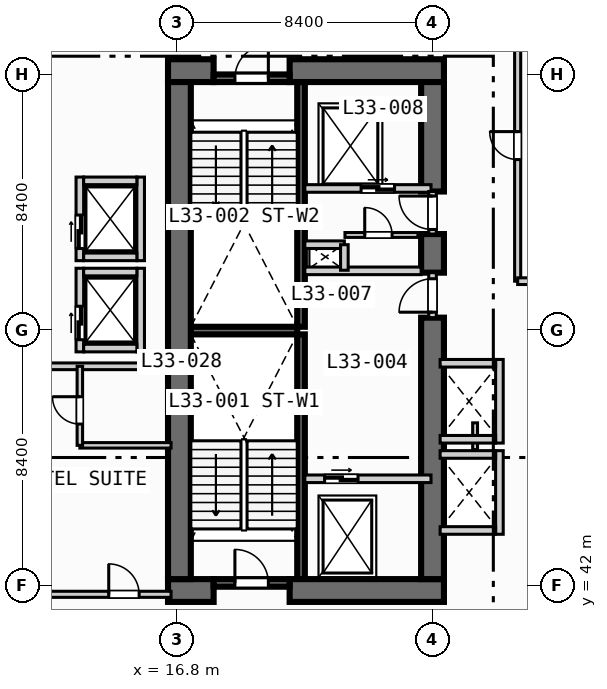
"""IFC4 building model, lengths in metres.
Left out: names, types, materials, properties, quantities, classifications, styles, units other than length and angle.
Written with IfcOpenShell. Run it as: python <this file> out.ifc"""

import sys

from ifc_helpers import new_model, si_unit, direction, frame, frame_2d, origin, place, context, subcontext, project, spatial, rectangle, extrude, element, fill, save


model = new_model("IFC4")
c1 = context("Model", 3, precision=1e-05, world=origin(), true_north=direction((0.0, 1.0)))
c2 = subcontext(c1, "Body", "Model", "MODEL_VIEW")
j1 = project(units=[si_unit("LENGTHUNIT", "METRE"), si_unit("PLANEANGLEUNIT", "RADIAN")], contexts=[c1])
p1 = place(None, origin())
s1 = spatial("IfcSite", under=j1, at=p1, CompositionType="ELEMENT")
p2 = place(p1, origin())
s2 = spatial("IfcBuilding", under=s1, at=p2, CompositionType="ELEMENT")
p3 = place(p2, frame((0.0, 0.0, 138.0)))
s3 = spatial("IfcBuildingStorey", under=s2, at=p3, CompositionType="ELEMENT", Elevation=138.0)
for number, where, z_axis, x_axis in (
    (1, (20.875, 42.2, 0.0), (0.0, 0.0, 1.0), (0.0, 1.0, 0.0)),
    (2, (20.875, 50.5, 0.0), (0.0, 0.0, 1.0), (0.0, 1.0, 0.0)),
):
    element("IfcWall", number, at=place(p3, frame(where, z_axis=z_axis, x_axis=x_axis)), inside=s3, PredefinedType="SOLIDWALL", context=c2, shape_type="SweptSolid", body=[
        extrude(rectangle(XDim=8.05, YDim=0.25, at=frame_2d((4.025, 0.0))), origin(), (0.0, 0.0, 1.0), 3.55),
    ])
p4 = place(p3, frame((17.25, 50.375, 0.0), z_axis=(0.0, 0.0, 1.0), x_axis=(1.0, 0.0, 0.0)))
e3 = element("IfcWall", 3, at=p4, inside=s3, PredefinedType="SOLIDWALL", context=c2, shape_type="SweptSolid", body=[
    extrude(rectangle(XDim=3.5, YDim=0.25, at=frame_2d((1.75, 0.0))), origin(), (0.0, 0.0, 1.0), 3.55),
])
p5 = place(p3, frame((16.5, 41.825, 0.0), z_axis=(0.0, 0.0, 1.0), x_axis=(1.0, 0.0, 0.0)))
e4 = element("IfcWall", 4, at=p5, inside=s3, PredefinedType="SHEAR", context=c2, shape_type="SweptSolid", body=[
    extrude(rectangle(XDim=1.5, YDim=0.75, at=frame_2d((0.75, 0.0))), origin(), (0.0, 0.0, 1.0), 3.55),
])
p6 = place(p3, frame((20.5, 41.825, 0.0), z_axis=(0.0, 0.0, 1.0), x_axis=(1.0, 0.0, 0.0)))
e5 = element("IfcWall", 5, at=p6, inside=s3, PredefinedType="SHEAR", context=c2, shape_type="SweptSolid", body=[
    extrude(rectangle(XDim=5.075, YDim=0.75, at=frame_2d((2.538, 0.0))), origin(), (0.0, 0.0, 1.0), 3.55),
])
p7 = place(p3, frame((16.5, 58.925, 0.0), z_axis=(0.0, 0.0, 1.0), x_axis=(1.0, 0.0, 0.0)))
e6 = element("IfcWall", 6, at=p7, inside=s3, PredefinedType="SHEAR", context=c2, shape_type="SweptSolid", body=[
    extrude(rectangle(XDim=1.5, YDim=0.75, at=frame_2d((0.75, 0.0))), origin(), (0.0, 0.0, 1.0), 3.55),
])
p8 = place(p3, frame((20.5, 58.925, 0.0), z_axis=(0.0, 0.0, 1.0), x_axis=(1.0, 0.0, 0.0)))
e7 = element("IfcWall", 7, at=p8, inside=s3, PredefinedType="SHEAR", context=c2, shape_type="SweptSolid", body=[
    extrude(rectangle(XDim=5.075, YDim=0.75, at=frame_2d((2.538, 0.0))), origin(), (0.0, 0.0, 1.0), 3.55),
])
p9 = place(p3, frame((16.875, 42.2, 0.0), z_axis=(0.0, 0.0, 1.0), x_axis=(0.0, 1.0, 0.0)))
e8 = element("IfcWall", 8, at=p9, inside=s3, PredefinedType="SHEAR", context=c2, shape_type="SweptSolid", body=[
    extrude(rectangle(XDim=16.35, YDim=0.75, at=frame_2d((8.175, 0.0))), origin(), (0.0, 0.0, 1.0), 3.55),
])
p10 = place(p3, frame((25.2, 42.2, 0.0), z_axis=(0.0, 0.0, 1.0), x_axis=(0.0, 1.0, 0.0)))
e9 = element("IfcWall", 9, at=p10, inside=s3, PredefinedType="SHEAR", context=c2, shape_type="SweptSolid", body=[
    extrude(rectangle(XDim=8.6, YDim=0.75, at=frame_2d((4.3, 0.0))), origin(), (0.0, 0.0, 1.0), 3.55),
])
p11 = place(p3, frame((25.2, 52.28, 0.0), z_axis=(0.0, 0.0, 1.0), x_axis=(0.0, 1.0, 0.0)))
e10 = element("IfcWall", 10, at=p11, inside=s3, PredefinedType="SHEAR", context=c2, shape_type="SweptSolid", body=[
    extrude(rectangle(XDim=1.27, YDim=0.75, at=frame_2d((0.635, 0.0))), origin(), (0.0, 0.0, 1.0), 3.55),
])
p12 = place(p3, frame((25.2, 54.95, 0.0), z_axis=(0.0, 0.0, 1.0), x_axis=(0.0, 1.0, 0.0)))
e11 = element("IfcWall", 11, at=p12, inside=s3, PredefinedType="SHEAR", context=c2, shape_type="SweptSolid", body=[
    extrude(rectangle(XDim=3.6, YDim=0.75, at=frame_2d((1.8, 0.0))), origin(), (0.0, 0.0, 1.0), 3.55),
])
p13 = place(p3, frame((18.0, 42.075, 0.0), z_axis=(0.0, 0.0, 1.0), x_axis=(1.0, 0.0, 0.0)))
e12 = element("IfcWall", 12, at=p13, inside=s3, PredefinedType="SOLIDWALL", context=c2, shape_type="SweptSolid", body=[
    extrude(rectangle(XDim=2.5, YDim=0.25, at=frame_2d((1.25, 0.0))), origin(), (0.0, 0.0, 1.0), 3.55),
])
p14 = place(p13, frame((0.7, 0.0, 0.0)))
e13 = element("IfcOpeningElement", 13, at=p14, cuts=e12, PredefinedType="OPENING", context=c2, shape_type="SweptSolid", body=[
    extrude(rectangle(XDim=1.1, YDim=2.15, at=frame_2d((0.55, 1.075))), frame((0.0, 0.135, 0.0), z_axis=(0.0, -1.0, 0.0), x_axis=(1.0, 0.0, 0.0)), (0.0, 0.0, 1.0), 0.27),
])
p15 = place(p3, frame((18.0, 58.675, 0.0), z_axis=(0.0, 0.0, 1.0), x_axis=(1.0, 0.0, 0.0)))
e14 = element("IfcWall", 14, at=p15, inside=s3, PredefinedType="SOLIDWALL", context=c2, shape_type="SweptSolid", body=[
    extrude(rectangle(XDim=2.5, YDim=0.25, at=frame_2d((1.25, 0.0))), origin(), (0.0, 0.0, 1.0), 3.55),
])
p16 = place(p15, frame((0.7, 0.0, 0.0)))
e15 = element("IfcOpeningElement", 15, at=p16, cuts=e14, PredefinedType="OPENING", context=c2, shape_type="SweptSolid", body=[
    extrude(rectangle(XDim=1.1, YDim=2.15, at=frame_2d((0.55, 1.075))), frame((0.0, 0.135, 0.0), z_axis=(0.0, -1.0, 0.0), x_axis=(1.0, 0.0, 0.0)), (0.0, 0.0, 1.0), 0.27),
])
p17 = place(p3, frame((21.0, 45.5, 0.0), z_axis=(0.0, 0.0, 1.0), x_axis=(1.0, 0.0, 0.0)))
e16 = element("IfcWall", 16, at=p17, inside=s3, PredefinedType="SOLIDWALL", context=c2, shape_type="SweptSolid", body=[
    extrude(rectangle(XDim=4.15, YDim=0.25, at=frame_2d((2.075, 0.0))), origin(), (0.0, 0.0, 1.0), 3.55),
])
p18 = place(p17, frame((0.65, 0.0, 0.0)))
e17 = element("IfcOpeningElement", 17, at=p18, cuts=e16, PredefinedType="OPENING", context=c2, shape_type="SweptSolid", body=[
    extrude(rectangle(XDim=1.1, YDim=2.15, at=frame_2d((0.55, 1.075))), frame((0.0, 0.135, 0.0), z_axis=(0.0, -1.0, 0.0), x_axis=(1.0, 0.0, 0.0)), (0.0, 0.0, 1.0), 0.27),
])
p19 = place(p3, frame((25.2, 50.8, 0.0), z_axis=(0.0, 0.0, 1.0), x_axis=(0.0, 1.0, 0.0)))
e18 = element("IfcWall", 18, at=p19, inside=s3, PredefinedType="SOLIDWALL", context=c2, shape_type="SweptSolid", body=[
    extrude(rectangle(XDim=1.48, YDim=0.25, at=frame_2d((0.74, 0.0))), origin(), (0.0, 0.0, 1.0), 3.55),
])
p20 = place(p19, frame((0.18, 0.0, 0.0)))
e19 = element("IfcOpeningElement", 19, at=p20, cuts=e18, PredefinedType="OPENING", context=c2, shape_type="SweptSolid", body=[
    extrude(rectangle(XDim=1.1, YDim=2.15, at=frame_2d((0.55, 1.075))), frame((0.0, 0.135, 0.0), z_axis=(0.0, -1.0, 0.0), x_axis=(1.0, 0.0, 0.0)), (0.0, 0.0, 1.0), 0.27),
])
p21 = place(p3, frame((21.0, 52.34, 0.0), z_axis=(0.0, 0.0, 1.0), x_axis=(1.0, 0.0, 0.0)))
e20 = element("IfcWall", 20, at=p21, inside=s3, PredefinedType="SOLIDWALL", context=c2, shape_type="SweptSolid", body=[
    extrude(rectangle(XDim=3.825, YDim=0.25, at=frame_2d((1.913, 0.0))), origin(), (0.0, 0.0, 1.0), 3.55),
])
p22 = place(p3, frame((21.0, 55.05, 0.0), z_axis=(0.0, 0.0, 1.0), x_axis=(1.0, 0.0, 0.0)))
e21 = element("IfcWall", 21, at=p22, inside=s3, PredefinedType="SOLIDWALL", context=c2, shape_type="SweptSolid", body=[
    extrude(rectangle(XDim=4.15, YDim=0.25, at=frame_2d((2.075, 0.0))), origin(), (0.0, 0.0, 1.0), 3.55),
])
p23 = place(p22, frame((1.85, 0.0, 0.0)))
e22 = element("IfcOpeningElement", 22, at=p23, cuts=e21, PredefinedType="OPENING", context=c2, shape_type="SweptSolid", body=[
    extrude(rectangle(XDim=1.1, YDim=2.15, at=frame_2d((0.55, 1.075))), frame((0.0, 0.135, 0.0), z_axis=(0.0, -1.0, 0.0), x_axis=(1.0, 0.0, 0.0)), (0.0, 0.0, 1.0), 0.27),
])
p24 = place(p3, frame((25.2, 53.55, 0.0), z_axis=(0.0, 0.0, 1.0), x_axis=(0.0, 1.0, 0.0)))
e23 = element("IfcWall", 23, at=p24, inside=s3, PredefinedType="SOLIDWALL", context=c2, shape_type="SweptSolid", body=[
    extrude(rectangle(XDim=1.4, YDim=0.25, at=frame_2d((0.7, 0.0))), origin(), (0.0, 0.0, 1.0), 3.55),
])
p25 = place(p24, frame((0.15, 0.0, 0.0)))
e24 = element("IfcOpeningElement", 24, at=p25, cuts=e23, PredefinedType="OPENING", context=c2, shape_type="SweptSolid", body=[
    extrude(rectangle(XDim=1.1, YDim=2.15, at=frame_2d((0.55, 1.075))), frame((0.0, 0.135, 0.0), z_axis=(0.0, -1.0, 0.0), x_axis=(1.0, 0.0, 0.0)), (0.0, 0.0, 1.0), 0.27),
])
p26 = place(p3, frame((21.0, 53.2, 0.0), z_axis=(0.0, 0.0, 1.0), x_axis=(1.0, 0.0, 0.0)))
e25 = element("IfcWall", 25, at=p26, inside=s3, PredefinedType="SOLIDWALL", context=c2, shape_type="SweptSolid", body=[
    extrude(rectangle(XDim=1.3, YDim=0.25, at=frame_2d((0.65, 0.0))), origin(), (0.0, 0.0, 1.0), 3.55),
])
p27 = place(p3, frame((22.3, 52.36, 0.0), z_axis=(0.0, 0.0, 1.0), x_axis=(0.0, 1.0, 0.0)))
e26 = element("IfcWall", 26, at=p27, inside=s3, PredefinedType="SOLIDWALL", context=c2, shape_type="SweptSolid", body=[
    extrude(rectangle(XDim=0.84, YDim=0.25, at=frame_2d((0.42, 0.0))), origin(), (0.0, 0.0, 1.0), 3.55),
])
p28 = place(p3, frame((22.32, 53.52, 0.0), z_axis=(0.0, 0.0, 1.0), x_axis=(1.0, 0.0, 0.0)))
e27 = element("IfcWall", 27, at=p28, inside=s3, PredefinedType="PARTITIONING", context=c2, shape_type="SweptSolid", body=[
    extrude(rectangle(XDim=2.4, YDim=0.16, at=frame_2d((1.2, 0.0))), origin(), (0.0, 0.0, 1.0), 3.55),
])
p29 = place(p28, frame((0.65, 0.0, 0.0)))
e28 = element("IfcOpeningElement", 28, at=p29, cuts=e27, PredefinedType="OPENING", context=c2, shape_type="SweptSolid", body=[
    extrude(rectangle(XDim=0.9, YDim=2.1, at=frame_2d((0.45, 1.05))), frame((0.0, 0.09, 0.0), z_axis=(0.0, -1.0, 0.0), x_axis=(1.0, 0.0, 0.0)), (0.0, 0.0, 1.0), 0.18),
])
p30 = place(p3, frame((13.6, 49.675, 0.0), z_axis=(0.0, 0.0, 1.0), x_axis=(0.0, 1.0, 0.0)))
e29 = element("IfcWall", 29, at=p30, inside=s3, PredefinedType="SOLIDWALL", context=c2, shape_type="SweptSolid", body=[
    extrude(rectangle(XDim=2.75, YDim=0.25, at=frame_2d((1.375, 0.0))), origin(), (0.0, 0.0, 1.0), 3.55),
])
p31 = place(p30, frame((0.4, 0.0, 0.0)))
e30 = element("IfcOpeningElement", 30, at=p31, cuts=e29, PredefinedType="OPENING", context=c2, shape_type="SweptSolid", body=[
    extrude(rectangle(XDim=1.1, YDim=2.15, at=frame_2d((0.55, 1.075))), frame((0.0, 0.135, 0.0), z_axis=(0.0, -1.0, 0.0), x_axis=(1.0, 0.0, 0.0)), (0.0, 0.0, 1.0), 0.27),
])
p32 = place(p3, frame((15.6, 49.675, 0.0), z_axis=(0.0, 0.0, 1.0), x_axis=(0.0, 1.0, 0.0)))
e31 = element("IfcWall", 31, at=p32, inside=s3, PredefinedType="SOLIDWALL", context=c2, shape_type="SweptSolid", body=[
    extrude(rectangle(XDim=2.75, YDim=0.25, at=frame_2d((1.375, 0.0))), origin(), (0.0, 0.0, 1.0), 3.55),
])
for number, where, z_axis, x_axis in (
    (32, (13.725, 49.8, 0.0), (0.0, 0.0, 1.0), (1.0, 0.0, 0.0)),
    (33, (13.725, 52.3, 0.0), (0.0, 0.0, 1.0), (1.0, 0.0, 0.0)),
):
    element("IfcWall", number, at=place(p3, frame(where, z_axis=z_axis, x_axis=x_axis)), inside=s3, PredefinedType="SOLIDWALL", context=c2, shape_type="SweptSolid", body=[
        extrude(rectangle(XDim=1.75, YDim=0.25, at=frame_2d((0.875, 0.0))), origin(), (0.0, 0.0, 1.0), 3.55),
    ])
p33 = place(p3, frame((13.6, 52.675, 0.0), z_axis=(0.0, 0.0, 1.0), x_axis=(0.0, 1.0, 0.0)))
e34 = element("IfcWall", 34, at=p33, inside=s3, PredefinedType="SOLIDWALL", context=c2, shape_type="SweptSolid", body=[
    extrude(rectangle(XDim=2.75, YDim=0.25, at=frame_2d((1.375, 0.0))), origin(), (0.0, 0.0, 1.0), 3.55),
])
p34 = place(p33, frame((0.4, 0.0, 0.0)))
e35 = element("IfcOpeningElement", 35, at=p34, cuts=e34, PredefinedType="OPENING", context=c2, shape_type="SweptSolid", body=[
    extrude(rectangle(XDim=1.1, YDim=2.15, at=frame_2d((0.55, 1.075))), frame((0.0, 0.135, 0.0), z_axis=(0.0, -1.0, 0.0), x_axis=(1.0, 0.0, 0.0)), (0.0, 0.0, 1.0), 0.27),
])
p35 = place(p3, frame((15.6, 52.675, 0.0), z_axis=(0.0, 0.0, 1.0), x_axis=(0.0, 1.0, 0.0)))
e36 = element("IfcWall", 36, at=p35, inside=s3, PredefinedType="SOLIDWALL", context=c2, shape_type="SweptSolid", body=[
    extrude(rectangle(XDim=2.75, YDim=0.25, at=frame_2d((1.375, 0.0))), origin(), (0.0, 0.0, 1.0), 3.55),
])
for number, where, z_axis, x_axis in (
    (37, (13.725, 52.8, 0.0), (0.0, 0.0, 1.0), (1.0, 0.0, 0.0)),
    (38, (13.725, 55.3, 0.0), (0.0, 0.0, 1.0), (1.0, 0.0, 0.0)),
):
    element("IfcWall", number, at=place(p3, frame(where, z_axis=z_axis, x_axis=x_axis)), inside=s3, PredefinedType="SOLIDWALL", context=c2, shape_type="SweptSolid", body=[
        extrude(rectangle(XDim=1.75, YDim=0.25, at=frame_2d((0.875, 0.0))), origin(), (0.0, 0.0, 1.0), 3.55),
    ])
p36 = place(p3, frame((27.4, 43.675, 0.0), z_axis=(0.0, 0.0, 1.0), x_axis=(0.0, 1.0, 0.0)))
e39 = element("IfcWall", 39, at=p36, inside=s3, PredefinedType="SOLIDWALL", context=c2, shape_type="SweptSolid", body=[
    extrude(rectangle(XDim=2.75, YDim=0.25, at=frame_2d((1.375, 0.0))), origin(), (0.0, 0.0, 1.0), 3.55),
])
for number, where, z_axis, x_axis in (
    (40, (25.45, 43.8, 0.0), (0.0, 0.0, 1.0), (1.0, 0.0, 0.0)),
    (41, (25.45, 46.3, 0.0), (0.0, 0.0, 1.0), (1.0, 0.0, 0.0)),
):
    element("IfcWall", number, at=place(p3, frame(where, z_axis=z_axis, x_axis=x_axis)), inside=s3, PredefinedType="SOLIDWALL", context=c2, shape_type="SweptSolid", body=[
        extrude(rectangle(XDim=1.825, YDim=0.25, at=frame_2d((0.913, 0.0))), origin(), (0.0, 0.0, 1.0), 3.55),
    ])
p37 = place(p3, frame((26.6, 46.46, 0.0), z_axis=(0.0, 0.0, 1.0), x_axis=(0.0, 1.0, 0.0)))
e42 = element("IfcWall", 42, at=p37, inside=s3, PredefinedType="PARTITIONING", context=c2, shape_type="SweptSolid", body=[
    extrude(rectangle(XDim=0.88, YDim=0.16, at=frame_2d((0.44, 0.0))), origin(), (0.0, 0.0, 1.0), 3.55),
])
p38 = place(p3, frame((27.4, 46.675, 0.0), z_axis=(0.0, 0.0, 1.0), x_axis=(0.0, 1.0, 0.0)))
e43 = element("IfcWall", 43, at=p38, inside=s3, PredefinedType="SOLIDWALL", context=c2, shape_type="SweptSolid", body=[
    extrude(rectangle(XDim=2.75, YDim=0.25, at=frame_2d((1.375, 0.0))), origin(), (0.0, 0.0, 1.0), 3.55),
])
for number, where, z_axis, x_axis in (
    (44, (25.45, 46.8, 0.0), (0.0, 0.0, 1.0), (1.0, 0.0, 0.0)),
    (45, (25.45, 49.3, 0.0), (0.0, 0.0, 1.0), (1.0, 0.0, 0.0)),
):
    element("IfcWall", number, at=place(p3, frame(where, z_axis=z_axis, x_axis=x_axis)), inside=s3, PredefinedType="SOLIDWALL", context=c2, shape_type="SweptSolid", body=[
        extrude(rectangle(XDim=1.825, YDim=0.25, at=frame_2d((0.913, 0.0))), origin(), (0.0, 0.0, 1.0), 3.55),
    ])
p39 = place(p3, frame((0.35, 41.7, 0.0), z_axis=(0.0, 0.0, 1.0), x_axis=(1.0, 0.0, 0.0)))
e46 = element("IfcWall", 46, at=p39, inside=s3, PredefinedType="PARTITIONING", context=c2, shape_type="SweptSolid", body=[
    extrude(rectangle(XDim=16.25, YDim=0.2, at=frame_2d((8.125, 0.0))), origin(), (0.0, 0.0, 1.0), 2.8),
])
p40 = place(p39, frame((14.2, 0.0, 0.0)))
e47 = element("IfcOpeningElement", 47, at=p40, cuts=e46, PredefinedType="OPENING", context=c2, shape_type="SweptSolid", body=[
    extrude(rectangle(XDim=1.0, YDim=2.15, at=frame_2d((0.5, 1.075))), frame((0.0, 0.11, 0.0), z_axis=(0.0, -1.0, 0.0), x_axis=(1.0, 0.0, 0.0)), (0.0, 0.0, 1.0), 0.22),
])
p41 = place(p3, frame((0.35, 49.2, 0.0), z_axis=(0.0, 0.0, 1.0), x_axis=(1.0, 0.0, 0.0)))
e48 = element("IfcWall", 48, at=p41, inside=s3, PredefinedType="PARTITIONING", context=c2, shape_type="SweptSolid", body=[
    extrude(rectangle(XDim=16.25, YDim=0.22, at=frame_2d((8.125, 0.0))), origin(), (0.0, 0.0, 1.0), 3.55),
])
p42 = place(p3, frame((13.6, 46.6, 0.0), z_axis=(0.0, 0.0, 1.0), x_axis=(1.0, 0.0, 0.0)))
e49 = element("IfcWall", 49, at=p42, inside=s3, PredefinedType="PLUMBINGWALL", context=c2, shape_type="SweptSolid", body=[
    extrude(rectangle(XDim=3.0, YDim=0.18, at=frame_2d((1.5, 0.0))), origin(), (0.0, 0.0, 1.0), 3.55),
])
p43 = place(p3, frame((13.6, 46.6, 0.0), z_axis=(0.0, 0.0, 1.0), x_axis=(0.0, 1.0, 0.0)))
e50 = element("IfcWall", 50, at=p43, inside=s3, PredefinedType="PLUMBINGWALL", context=c2, shape_type="SweptSolid", body=[
    extrude(rectangle(XDim=2.6, YDim=0.18, at=frame_2d((1.3, 0.0))), origin(), (0.0, 0.0, 1.0), 3.55),
])
p44 = place(p43, frame((0.7, 0.0, 0.0)))
e51 = element("IfcOpeningElement", 51, at=p44, cuts=e50, PredefinedType="OPENING", context=c2, shape_type="SweptSolid", body=[
    extrude(rectangle(XDim=0.9, YDim=2.1, at=frame_2d((0.45, 1.05))), frame((0.0, 0.1, 0.0), z_axis=(0.0, -1.0, 0.0), x_axis=(1.0, 0.0, 0.0)), (0.0, 0.0, 1.0), 0.2),
])
p45 = place(p3, frame((28.0, 52.0, 0.0), z_axis=(0.0, 0.0, 1.0), x_axis=(0.0, 1.0, 0.0)))
e52 = element("IfcWall", 52, at=p45, inside=s3, PredefinedType="PARTITIONING", context=c2, shape_type="SweptSolid", body=[
    extrude(rectangle(XDim=37.0, YDim=0.2, at=frame_2d((18.5, 0.0))), origin(), (0.0, 0.0, 1.0), 3.55),
])
p46 = place(p45, frame((4.0, 0.0, 0.0)))
e53 = element("IfcOpeningElement", 53, at=p46, cuts=e52, PredefinedType="OPENING", context=c2, shape_type="SweptSolid", body=[
    extrude(rectangle(XDim=0.92, YDim=2.1, at=frame_2d((0.46, 1.05))), frame((0.0, 0.11, 0.0), z_axis=(0.0, -1.0, 0.0), x_axis=(1.0, 0.0, 0.0)), (0.0, 0.0, 1.0), 0.22),
])
p47 = place(p3, frame((28.0, 52.0, 0.0), z_axis=(0.0, 0.0, 1.0), x_axis=(1.0, 0.0, 0.0)))
e54 = element("IfcWall", 54, at=p47, inside=s3, PredefinedType="PARTITIONING", context=c2, shape_type="SweptSolid", body=[
    extrude(rectangle(XDim=5.3, YDim=0.22, at=frame_2d((2.65, 0.0))), origin(), (0.0, 0.0, 1.0), 3.55),
])
p48 = place(p14, origin())
e55 = element("IfcDoor", 55, at=p48, inside=s3, OperationType="SINGLE_SWING_LEFT", PredefinedType="DOOR", context=c2, shape_type="SweptSolid", body=[
    extrude(rectangle(XDim=1.1, YDim=2.15, at=frame_2d((0.55, 1.075))), frame((0.0, 0.025, 0.0), z_axis=(0.0, -1.0, 0.0), x_axis=(1.0, 0.0, 0.0)), (0.0, 0.0, 1.0), 0.05),
])
fill(e13, e55)
p49 = place(p16, origin())
e56 = element("IfcDoor", 56, at=p49, inside=s3, OperationType="SINGLE_SWING_RIGHT", PredefinedType="DOOR", context=c2, shape_type="SweptSolid", body=[
    extrude(rectangle(XDim=1.1, YDim=2.15, at=frame_2d((0.55, 1.075))), frame((0.0, 0.025, 0.0), z_axis=(0.0, -1.0, 0.0), x_axis=(1.0, 0.0, 0.0)), (0.0, 0.0, 1.0), 0.05),
])
fill(e15, e56)
p50 = place(p18, origin())
e57 = element("IfcDoor", 57, at=p50, inside=s3, OperationType="SLIDING_TO_LEFT", PredefinedType="DOOR", context=c2, shape_type="SweptSolid", body=[
    extrude(rectangle(XDim=1.1, YDim=2.15, at=frame_2d((0.55, 1.075))), frame((0.0, 0.025, 0.0), z_axis=(0.0, -1.0, 0.0), x_axis=(1.0, 0.0, 0.0)), (0.0, 0.0, 1.0), 0.05),
])
fill(e17, e57)
p51 = place(p20, origin())
e58 = element("IfcDoor", 58, at=p51, inside=s3, OperationType="SINGLE_SWING_LEFT", PredefinedType="DOOR", context=c2, shape_type="SweptSolid", body=[
    extrude(rectangle(XDim=1.1, YDim=2.15, at=frame_2d((0.55, 1.075))), frame((0.0, 0.025, 0.0), z_axis=(0.0, -1.0, 0.0), x_axis=(1.0, 0.0, 0.0)), (0.0, 0.0, 1.0), 0.05),
])
fill(e19, e58)
p52 = place(p23, origin())
e59 = element("IfcDoor", 59, at=p52, inside=s3, OperationType="SLIDING_TO_LEFT", PredefinedType="DOOR", context=c2, shape_type="SweptSolid", body=[
    extrude(rectangle(XDim=1.1, YDim=2.15, at=frame_2d((0.55, 1.075))), frame((0.0, 0.025, 0.0), z_axis=(0.0, -1.0, 0.0), x_axis=(1.0, 0.0, 0.0)), (0.0, 0.0, 1.0), 0.05),
])
fill(e22, e59)
p53 = place(p25, origin())
e60 = element("IfcDoor", 60, at=p53, inside=s3, OperationType="SINGLE_SWING_RIGHT", PredefinedType="DOOR", context=c2, shape_type="SweptSolid", body=[
    extrude(rectangle(XDim=1.1, YDim=2.15, at=frame_2d((0.55, 1.075))), frame((0.0, 0.025, 0.0), z_axis=(0.0, -1.0, 0.0), x_axis=(1.0, 0.0, 0.0)), (0.0, 0.0, 1.0), 0.05),
])
fill(e24, e60)
p54 = place(p29, origin())
e61 = element("IfcDoor", 61, at=p54, inside=s3, OperationType="SINGLE_SWING_LEFT", PredefinedType="DOOR", context=c2, shape_type="SweptSolid", body=[
    extrude(rectangle(XDim=0.9, YDim=2.1, at=frame_2d((0.45, 1.05))), frame((0.0, 0.025, 0.0), z_axis=(0.0, -1.0, 0.0), x_axis=(1.0, 0.0, 0.0)), (0.0, 0.0, 1.0), 0.05),
])
fill(e28, e61)
p55 = place(p31, origin())
e62 = element("IfcDoor", 62, at=p55, inside=s3, OperationType="SLIDING_TO_LEFT", PredefinedType="DOOR", context=c2, shape_type="SweptSolid", body=[
    extrude(rectangle(XDim=1.1, YDim=2.15, at=frame_2d((0.55, 1.075))), frame((0.0, 0.025, 0.0), z_axis=(0.0, -1.0, 0.0), x_axis=(1.0, 0.0, 0.0)), (0.0, 0.0, 1.0), 0.05),
])
fill(e30, e62)
p56 = place(p34, origin())
e63 = element("IfcDoor", 63, at=p56, inside=s3, OperationType="SLIDING_TO_LEFT", PredefinedType="DOOR", context=c2, shape_type="SweptSolid", body=[
    extrude(rectangle(XDim=1.1, YDim=2.15, at=frame_2d((0.55, 1.075))), frame((0.0, 0.025, 0.0), z_axis=(0.0, -1.0, 0.0), x_axis=(1.0, 0.0, 0.0)), (0.0, 0.0, 1.0), 0.05),
])
fill(e35, e63)
p57 = place(p40, origin())
e64 = element("IfcDoor", 64, at=p57, inside=s3, OperationType="SINGLE_SWING_LEFT", PredefinedType="DOOR", context=c2, shape_type="SweptSolid", body=[
    extrude(rectangle(XDim=1.0, YDim=2.15, at=frame_2d((0.5, 1.075))), frame((0.0, 0.025, 0.0), z_axis=(0.0, -1.0, 0.0), x_axis=(1.0, 0.0, 0.0)), (0.0, 0.0, 1.0), 0.05),
])
fill(e47, e64)
p58 = place(p44, origin())
e65 = element("IfcDoor", 65, at=p58, inside=s3, OperationType="SINGLE_SWING_RIGHT", PredefinedType="DOOR", context=c2, shape_type="SweptSolid", body=[
    extrude(rectangle(XDim=0.9, YDim=2.1, at=frame_2d((0.45, 1.05))), frame((0.0, 0.025, 0.0), z_axis=(0.0, -1.0, 0.0), x_axis=(1.0, 0.0, 0.0)), (0.0, 0.0, 1.0), 0.05),
])
fill(e51, e65)
p59 = place(p46, origin())
e66 = element("IfcDoor", 66, at=p59, inside=s3, OperationType="SINGLE_SWING_RIGHT", PredefinedType="DOOR", context=c2, shape_type="SweptSolid", body=[
    extrude(rectangle(XDim=0.92, YDim=2.1, at=frame_2d((0.46, 1.05))), frame((0.0, 0.025, 0.0), z_axis=(0.0, -1.0, 0.0), x_axis=(1.0, 0.0, 0.0)), (0.0, 0.0, 1.0), 0.05),
])
fill(e53, e66)
save(model, sys.argv[1])
